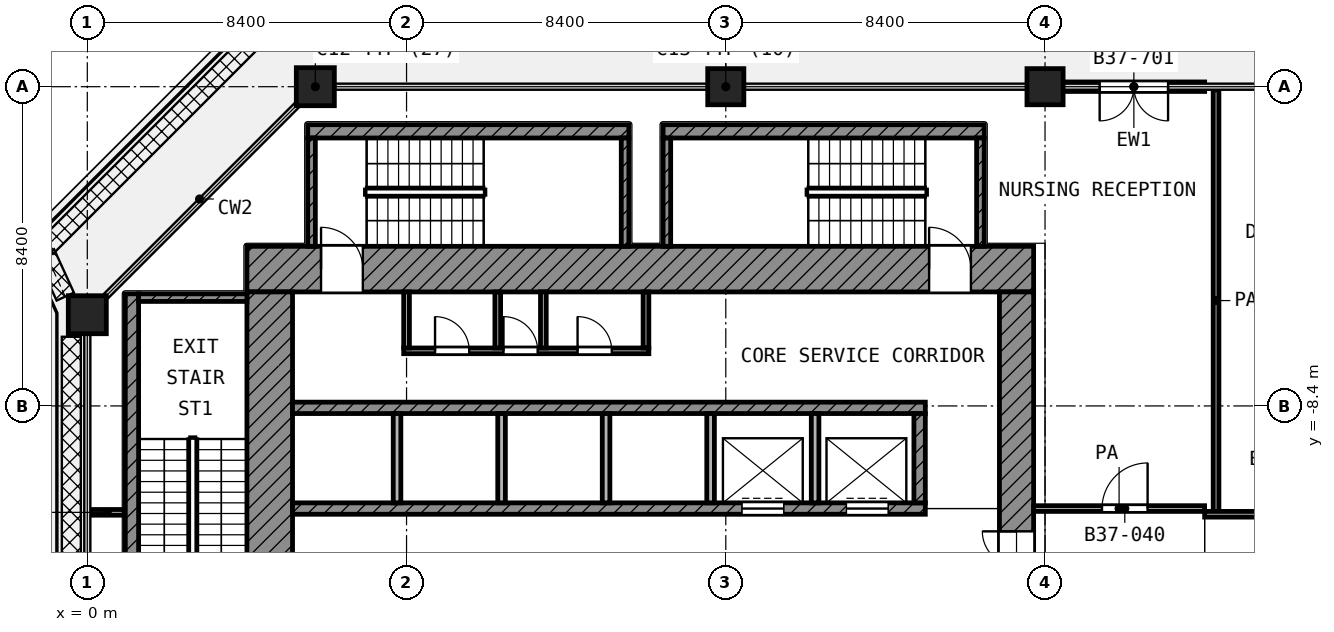
"""IFC4 building model, lengths in metres.
Left out: names, types, materials, properties, quantities, classifications, styles, units other than length and angle.
Written with IfcOpenShell. Run it as: python <this file> out.ifc"""

import sys

from ifc_helpers import new_model, si_unit, direction, frame, frame_2d, origin, origin_2d, place, context, subcontext, project, spatial, rectangle, extrude, element, fill, save


model = new_model("IFC4")
c1 = context("Model", 3, precision=1e-05, world=origin(), true_north=direction((0.0, 1.0)))
c2 = subcontext(c1, "Body", "Model", "MODEL_VIEW")
j1 = project(units=[si_unit("LENGTHUNIT", "METRE"), si_unit("PLANEANGLEUNIT", "RADIAN")], contexts=[c1])
p1 = place(None, origin())
s1 = spatial("IfcSite", under=j1, at=p1, CompositionType="ELEMENT")
p2 = place(p1, origin())
s2 = spatial("IfcBuilding", under=s1, at=p2, CompositionType="ELEMENT")
p3 = place(p2, frame((0.0, 0.0, 162.6)))
s3 = spatial("IfcBuildingStorey", under=s2, at=p3, CompositionType="ELEMENT", Elevation=162.6)
p4 = place(p3, frame((6.0, 0.0, 0.0), z_axis=(0.0, 0.0, 1.0), x_axis=(1.0, 0.0, 0.0)))
e1 = element("IfcColumn", 1, at=p4, inside=s3, PredefinedType="COLUMN", context=c2, shape_type="SweptSolid", body=[
    extrude(rectangle(XDim=1.0, YDim=1.0, at=origin_2d()), origin(), (0.0, 0.0, 1.0), 4.2),
])
for number, where, z_axis, x_axis in (
    (2, (16.8, 0.0, 0.0), (0.0, 0.0, 1.0), (1.0, 0.0, 0.0)),
    (3, (25.2, 0.0, 0.0), (0.0, 0.0, 1.0), (1.0, 0.0, 0.0)),
):
    element("IfcColumn", number, at=place(p3, frame(where, z_axis=z_axis, x_axis=x_axis)), inside=s3, PredefinedType="COLUMN", context=c2, shape_type="SweptSolid", body=[
        extrude(rectangle(XDim=0.95, YDim=0.95, at=origin_2d()), origin(), (0.0, 0.0, 1.0), 4.2),
    ])
p5 = place(p3, frame((0.0, -6.0, 0.0), z_axis=(0.0, 0.0, 1.0), x_axis=(1.0, 0.0, 0.0)))
e4 = element("IfcColumn", 4, at=p5, inside=s3, PredefinedType="COLUMN", context=c2, shape_type="SweptSolid", body=[
    extrude(rectangle(XDim=1.0, YDim=1.0, at=origin_2d()), origin(), (0.0, 0.0, 1.0), 4.2),
])
p6 = place(p3, frame((29.4, 0.0, 0.0), z_axis=(0.0, 0.0, 1.0), x_axis=(-1.0, 0.0, 0.0)))
e5 = element("IfcWall", 5, at=p6, inside=s3, PredefinedType="SOLIDWALL", context=c2, shape_type="SweptSolid", body=[
    extrude(rectangle(XDim=3.725, YDim=0.25, at=frame_2d((1.862, 0.0))), origin(), (0.0, 0.0, 1.0), 2.58),
])
p7 = place(p6, frame((0.962, 0.0, 0.0)))
e6 = element("IfcOpeningElement", 6, at=p7, cuts=e5, PredefinedType="OPENING", context=c2, shape_type="SweptSolid", body=[
    extrude(rectangle(XDim=1.8, YDim=2.1, at=frame_2d((0.9, 1.05))), frame((0.0, 0.135, 0.0), z_axis=(0.0, -1.0, 0.0), x_axis=(1.0, 0.0, 0.0)), (0.0, 0.0, 1.0), 0.27),
])
p8 = place(p3, frame((4.2, -4.8, 0.0), z_axis=(0.0, 0.0, 1.0), x_axis=(1.0, 0.0, 0.0)))
e7 = element("IfcWall", 7, at=p8, inside=s3, PredefinedType="SHEAR", context=c2, shape_type="SweptSolid", body=[
    extrude(rectangle(XDim=20.7, YDim=1.2, at=frame_2d((10.35, 0.0))), origin(), (0.0, 0.0, 1.0), 3.6),
])
p9 = place(p8, frame((1.95, 0.0, 0.0)))
e8 = element("IfcOpeningElement", 8, at=p9, cuts=e7, PredefinedType="OPENING", context=c2, shape_type="SweptSolid", body=[
    extrude(rectangle(XDim=1.1, YDim=2.1, at=frame_2d((0.55, 1.05))), frame((0.0, 0.61, 0.0), z_axis=(0.0, -1.0, 0.0), x_axis=(1.0, 0.0, 0.0)), (0.0, 0.0, 1.0), 1.22),
])
p10 = place(p8, frame((17.95, 0.0, 0.0)))
e9 = element("IfcOpeningElement", 9, at=p10, cuts=e7, PredefinedType="OPENING", context=c2, shape_type="SweptSolid", body=[
    extrude(rectangle(XDim=1.1, YDim=2.1, at=frame_2d((0.55, 1.05))), frame((0.0, 0.61, 0.0), z_axis=(0.0, -1.0, 0.0), x_axis=(1.0, 0.0, 0.0)), (0.0, 0.0, 1.0), 1.22),
])
p11 = place(p3, frame((4.8, -24.9, 0.0), z_axis=(0.0, 0.0, 1.0), x_axis=(0.0, 1.0, 0.0)))
e10 = element("IfcWall", 10, at=p11, inside=s3, PredefinedType="SHEAR", context=c2, shape_type="SweptSolid", body=[
    extrude(rectangle(XDim=19.5, YDim=1.2, at=frame_2d((9.75, 0.0))), origin(), (0.0, 0.0, 1.0), 3.6),
])
p12 = place(p11, frame((11.35, 0.0, 0.0)))
e11 = element("IfcOpeningElement", 11, at=p12, cuts=e10, PredefinedType="OPENING", context=c2, shape_type="SweptSolid", body=[
    extrude(rectangle(XDim=1.1, YDim=2.1, at=frame_2d((0.55, 1.05))), frame((0.0, 0.61, 0.0), z_axis=(0.0, -1.0, 0.0), x_axis=(1.0, 0.0, 0.0)), (0.0, 0.0, 1.0), 1.22),
])
p13 = place(p11, frame((2.05, 0.0, 0.0)))
e12 = element("IfcOpeningElement", 12, at=p13, cuts=e10, PredefinedType="OPENING", context=c2, shape_type="SweptSolid", body=[
    extrude(rectangle(XDim=1.1, YDim=2.1, at=frame_2d((0.55, 1.05))), frame((0.0, 0.61, 0.0), z_axis=(0.0, -1.0, 0.0), x_axis=(1.0, 0.0, 0.0)), (0.0, 0.0, 1.0), 1.22),
])
p14 = place(p3, frame((24.45, -24.0, 0.0), z_axis=(0.0, 0.0, 1.0), x_axis=(0.0, 1.0, 0.0)))
e13 = element("IfcWall", 13, at=p14, inside=s3, PredefinedType="SHEAR", context=c2, shape_type="SweptSolid", body=[
    extrude(rectangle(XDim=18.6, YDim=0.9, at=frame_2d((9.3, 0.0))), origin(), (0.0, 0.0, 1.0), 3.6),
])
p15 = place(p14, frame((10.5, 0.0, 0.0)))
e14 = element("IfcOpeningElement", 14, at=p15, cuts=e13, PredefinedType="OPENING", context=c2, shape_type="SweptSolid", body=[
    extrude(rectangle(XDim=1.8, YDim=2.1, at=frame_2d((0.9, 1.05))), frame((0.0, 0.46, 0.0), z_axis=(0.0, -1.0, 0.0), x_axis=(1.0, 0.0, 0.0)), (0.0, 0.0, 1.0), 0.92),
])
p16 = place(p3, frame((5.4, -8.45, 0.0), z_axis=(0.0, 0.0, 1.0), x_axis=(1.0, 0.0, 0.0)))
e15 = element("IfcWall", 15, at=p16, inside=s3, PredefinedType="SHEAR", context=c2, shape_type="SweptSolid", body=[
    extrude(rectangle(XDim=16.65, YDim=0.3, at=frame_2d((8.325, 0.0))), origin(), (0.0, 0.0, 1.0), 3.6),
])
p17 = place(p3, frame((5.4, -11.1, 0.0), z_axis=(0.0, 0.0, 1.0), x_axis=(1.0, 0.0, 0.0)))
e16 = element("IfcWall", 16, at=p17, inside=s3, PredefinedType="SHEAR", context=c2, shape_type="SweptSolid", body=[
    extrude(rectangle(XDim=16.65, YDim=0.3, at=frame_2d((8.325, 0.0))), origin(), (0.0, 0.0, 1.0), 3.6),
])
p18 = place(p17, frame((11.825, 0.0, 0.0)))
e17 = element("IfcOpeningElement", 17, at=p18, cuts=e16, PredefinedType="OPENING", context=c2, shape_type="SweptSolid", body=[
    extrude(rectangle(XDim=1.1, YDim=2.1, at=frame_2d((0.55, 1.05))), frame((0.0, 0.16, 0.0), z_axis=(0.0, -1.0, 0.0), x_axis=(1.0, 0.0, 0.0)), (0.0, 0.0, 1.0), 0.32),
])
p19 = place(p17, frame((14.575, 0.0, 0.0)))
e18 = element("IfcOpeningElement", 18, at=p19, cuts=e16, PredefinedType="OPENING", context=c2, shape_type="SweptSolid", body=[
    extrude(rectangle(XDim=1.1, YDim=2.1, at=frame_2d((0.55, 1.05))), frame((0.0, 0.16, 0.0), z_axis=(0.0, -1.0, 0.0), x_axis=(1.0, 0.0, 0.0)), (0.0, 0.0, 1.0), 0.32),
])
p20 = place(p3, frame((21.9, -10.95, 0.0), z_axis=(0.0, 0.0, 1.0), x_axis=(0.0, 1.0, 0.0)))
e19 = element("IfcWall", 19, at=p20, inside=s3, PredefinedType="SHEAR", context=c2, shape_type="SweptSolid", body=[
    extrude(rectangle(XDim=2.35, YDim=0.3, at=frame_2d((1.175, 0.0))), origin(), (0.0, 0.0, 1.0), 3.6),
])
for number, where, z_axis, x_axis in (
    (20, (8.15, -10.95, 0.0), (0.0, 0.0, 1.0), (0.0, 1.0, 0.0)),
    (21, (10.9, -10.95, 0.0), (0.0, 0.0, 1.0), (0.0, 1.0, 0.0)),
    (22, (13.65, -10.95, 0.0), (0.0, 0.0, 1.0), (0.0, 1.0, 0.0)),
    (23, (16.4, -10.95, 0.0), (0.0, 0.0, 1.0), (0.0, 1.0, 0.0)),
    (24, (19.15, -10.95, 0.0), (0.0, 0.0, 1.0), (0.0, 1.0, 0.0)),
):
    element("IfcWall", number, at=place(p3, frame(where, z_axis=z_axis, x_axis=x_axis)), inside=s3, PredefinedType="PARTITIONING", context=c2, shape_type="SweptSolid", body=[
        extrude(rectangle(XDim=2.35, YDim=0.2, at=frame_2d((1.175, 0.0))), origin(), (0.0, 0.0, 1.0), 3.6),
    ])
p21 = place(p3, frame((8.325, -6.95, 0.0), z_axis=(0.0, 0.0, 1.0), x_axis=(1.0, 0.0, 0.0)))
e25 = element("IfcWall", 25, at=p21, inside=s3, PredefinedType="PARTITIONING", context=c2, shape_type="SweptSolid", body=[
    extrude(rectangle(XDim=6.45, YDim=0.15, at=frame_2d((3.225, 0.0))), origin(), (0.0, 0.0, 1.0), 3.6),
])
p22 = place(p21, frame((0.825, 0.0, 0.0)))
e26 = element("IfcOpeningElement", 26, at=p22, cuts=e25, PredefinedType="OPENING", context=c2, shape_type="SweptSolid", body=[
    extrude(rectangle(XDim=0.9, YDim=2.1, at=frame_2d((0.45, 1.05))), frame((0.0, 0.085, 0.0), z_axis=(0.0, -1.0, 0.0), x_axis=(1.0, 0.0, 0.0)), (0.0, 0.0, 1.0), 0.17),
])
p23 = place(p21, frame((2.625, 0.0, 0.0)))
e27 = element("IfcOpeningElement", 27, at=p23, cuts=e25, PredefinedType="OPENING", context=c2, shape_type="SweptSolid", body=[
    extrude(rectangle(XDim=0.9, YDim=2.1, at=frame_2d((0.45, 1.05))), frame((0.0, 0.085, 0.0), z_axis=(0.0, -1.0, 0.0), x_axis=(1.0, 0.0, 0.0)), (0.0, 0.0, 1.0), 0.17),
])
p24 = place(p21, frame((4.575, 0.0, 0.0)))
e28 = element("IfcOpeningElement", 28, at=p24, cuts=e25, PredefinedType="OPENING", context=c2, shape_type="SweptSolid", body=[
    extrude(rectangle(XDim=0.9, YDim=2.1, at=frame_2d((0.45, 1.05))), frame((0.0, 0.085, 0.0), z_axis=(0.0, -1.0, 0.0), x_axis=(1.0, 0.0, 0.0)), (0.0, 0.0, 1.0), 0.17),
])
for number, where, z_axis, x_axis in (
    (29, (8.4, -6.875, 0.0), (0.0, 0.0, 1.0), (0.0, 1.0, 0.0)),
    (30, (10.8, -6.875, 0.0), (0.0, 0.0, 1.0), (0.0, 1.0, 0.0)),
    (31, (12.0, -6.875, 0.0), (0.0, 0.0, 1.0), (0.0, 1.0, 0.0)),
    (32, (14.7, -6.875, 0.0), (0.0, 0.0, 1.0), (0.0, 1.0, 0.0)),
):
    element("IfcWall", number, at=place(p3, frame(where, z_axis=z_axis, x_axis=x_axis)), inside=s3, PredefinedType="PARTITIONING", context=c2, shape_type="SweptSolid", body=[
        extrude(rectangle(XDim=1.475, YDim=0.15, at=frame_2d((0.738, 0.0))), origin(), (0.0, 0.0, 1.0), 3.6),
    ])
p25 = place(p3, frame((1.175, -13.9, 0.0), z_axis=(0.0, 0.0, 1.0), x_axis=(0.0, 1.0, 0.0)))
e33 = element("IfcWall", 33, at=p25, inside=s3, PredefinedType="SHEAR", context=c2, shape_type="SweptSolid", body=[
    extrude(rectangle(XDim=8.45, YDim=0.35, at=frame_2d((4.225, 0.0))), origin(), (0.0, 0.0, 1.0), 3.6),
])
p26 = place(p3, frame((1.35, -5.55, 0.0), z_axis=(0.0, 0.0, 1.0), x_axis=(1.0, 0.0, 0.0)))
e34 = element("IfcWall", 34, at=p26, inside=s3, PredefinedType="SHEAR", context=c2, shape_type="SweptSolid", body=[
    extrude(rectangle(XDim=2.85, YDim=0.2, at=frame_2d((1.425, 0.0))), origin(), (0.0, 0.0, 1.0), 3.6),
])
p27 = place(p3, frame((5.8, -1.175, 0.0), z_axis=(0.0, 0.0, 1.0), x_axis=(1.0, 0.0, 0.0)))
e35 = element("IfcWall", 35, at=p27, inside=s3, PredefinedType="SHEAR", context=c2, shape_type="SweptSolid", body=[
    extrude(rectangle(XDim=8.45, YDim=0.35, at=frame_2d((4.225, 0.0))), origin(), (0.0, 0.0, 1.0), 3.6),
])
for number, where, z_axis, x_axis in (
    (36, (5.9, -4.2, 0.0), (0.0, 0.0, 1.0), (0.0, 1.0, 0.0)),
    (37, (14.15, -4.2, 0.0), (0.0, 0.0, 1.0), (0.0, 1.0, 0.0)),
):
    element("IfcWall", number, at=place(p3, frame(where, z_axis=z_axis, x_axis=x_axis)), inside=s3, PredefinedType="SHEAR", context=c2, shape_type="SweptSolid", body=[
        extrude(rectangle(XDim=2.85, YDim=0.2, at=frame_2d((1.425, 0.0))), origin(), (0.0, 0.0, 1.0), 3.6),
    ])
p28 = place(p3, frame((15.15, -1.175, 0.0), z_axis=(0.0, 0.0, 1.0), x_axis=(1.0, 0.0, 0.0)))
e38 = element("IfcWall", 38, at=p28, inside=s3, PredefinedType="SHEAR", context=c2, shape_type="SweptSolid", body=[
    extrude(rectangle(XDim=8.45, YDim=0.35, at=frame_2d((4.225, 0.0))), origin(), (0.0, 0.0, 1.0), 3.6),
])
for number, where, z_axis, x_axis in (
    (39, (15.25, -4.2, 0.0), (0.0, 0.0, 1.0), (0.0, 1.0, 0.0)),
    (40, (23.5, -4.2, 0.0), (0.0, 0.0, 1.0), (0.0, 1.0, 0.0)),
):
    element("IfcWall", number, at=place(p3, frame(where, z_axis=z_axis, x_axis=x_axis)), inside=s3, PredefinedType="SHEAR", context=c2, shape_type="SweptSolid", body=[
        extrude(rectangle(XDim=2.85, YDim=0.2, at=frame_2d((1.425, 0.0))), origin(), (0.0, 0.0, 1.0), 3.6),
    ])
p29 = place(p3, frame((29.4, -11.25, 0.0), z_axis=(0.0, 0.0, 1.0), x_axis=(1.0, 0.0, 0.0)))
e41 = element("IfcWall", 41, at=p29, inside=s3, PredefinedType="PARTITIONING", context=c2, shape_type="SweptSolid", body=[
    extrude(rectangle(XDim=10.782, YDim=0.15, at=frame_2d((5.391, 0.0))), origin(), (0.0, 0.0, 1.0), 3.6),
])
p30 = place(p29, frame((1.75, 0.0, 0.0)))
e42 = element("IfcOpeningElement", 42, at=p30, cuts=e41, PredefinedType="OPENING", context=c2, shape_type="SweptSolid", body=[
    extrude(rectangle(XDim=1.0, YDim=2.1, at=frame_2d((0.5, 1.05))), frame((0.0, 0.085, 0.0), z_axis=(0.0, -1.0, 0.0), x_axis=(1.0, 0.0, 0.0)), (0.0, 0.0, 1.0), 0.17),
])
p31 = place(p29, frame((4.4, 0.0, 0.0)))
e43 = element("IfcOpeningElement", 43, at=p31, cuts=e41, PredefinedType="OPENING", context=c2, shape_type="SweptSolid", body=[
    extrude(rectangle(XDim=1.0, YDim=2.1, at=frame_2d((0.5, 1.05))), frame((0.0, 0.085, 0.0), z_axis=(0.0, -1.0, 0.0), x_axis=(1.0, 0.0, 0.0)), (0.0, 0.0, 1.0), 0.17),
])
p32 = place(p3, frame((0.08, -11.2, 0.0), z_axis=(0.0, 0.0, 1.0), x_axis=(1.0, 0.0, 0.0)))
e44 = element("IfcWall", 44, at=p32, inside=s3, PredefinedType="PARTITIONING", context=c2, shape_type="SweptSolid", body=[
    extrude(rectangle(XDim=0.89, YDim=0.15, at=frame_2d((0.445, 0.0))), origin(), (0.0, 0.0, 1.0), 3.6),
])
p33 = place(p3, frame((24.9, -11.1, 0.0), z_axis=(0.0, 0.0, 1.0), x_axis=(1.0, 0.0, 0.0)))
e45 = element("IfcWall", 45, at=p33, inside=s3, PredefinedType="PARTITIONING", context=c2, shape_type="SweptSolid", body=[
    extrude(rectangle(XDim=4.498, YDim=0.15, at=frame_2d((2.249, 0.0))), origin(), (0.0, 0.0, 1.0), 3.6),
])
p34 = place(p33, frame((1.799, 0.0, 0.0)))
e46 = element("IfcOpeningElement", 46, at=p34, cuts=e45, PredefinedType="OPENING", context=c2, shape_type="SweptSolid", body=[
    extrude(rectangle(XDim=1.2, YDim=2.1, at=frame_2d((0.6, 1.05))), frame((0.0, 0.085, 0.0), z_axis=(0.0, -1.0, 0.0), x_axis=(1.0, 0.0, 0.0)), (0.0, 0.0, 1.0), 0.17),
])
p35 = place(p3, frame((29.7, -11.175, 0.0), z_axis=(0.0, 0.0, 1.0), x_axis=(0.0, 1.0, 0.0)))
e47 = element("IfcWall", 47, at=p35, inside=s3, PredefinedType="PARTITIONING", context=c2, shape_type="SweptSolid", body=[
    extrude(rectangle(XDim=11.095, YDim=0.15, at=frame_2d((5.547, 0.0))), origin(), (0.0, 0.0, 1.0), 2.7),
])
p36 = place(p7, origin())
e48 = element("IfcDoor", 48, at=p36, inside=s3, OperationType="DOUBLE_DOOR_SINGLE_SWING", PredefinedType="DOOR", context=c2, shape_type="SweptSolid", body=[
    extrude(rectangle(XDim=1.8, YDim=2.1, at=frame_2d((0.9, 1.05))), frame((0.0, 0.025, 0.0), z_axis=(0.0, -1.0, 0.0), x_axis=(1.0, 0.0, 0.0)), (0.0, 0.0, 1.0), 0.05),
])
fill(e6, e48)
p37 = place(p18, origin())
e49 = element("IfcDoor", 49, at=p37, inside=s3, OperationType="DOUBLE_DOOR_SLIDING", PredefinedType="DOOR", context=c2, shape_type="SweptSolid", body=[
    extrude(rectangle(XDim=1.1, YDim=2.1, at=frame_2d((0.55, 1.05))), frame((0.0, 0.025, 0.0), z_axis=(0.0, -1.0, 0.0), x_axis=(1.0, 0.0, 0.0)), (0.0, 0.0, 1.0), 0.05),
])
fill(e17, e49)
p38 = place(p19, origin())
e50 = element("IfcDoor", 50, at=p38, inside=s3, OperationType="DOUBLE_DOOR_SLIDING", PredefinedType="DOOR", context=c2, shape_type="SweptSolid", body=[
    extrude(rectangle(XDim=1.1, YDim=2.1, at=frame_2d((0.55, 1.05))), frame((0.0, 0.025, 0.0), z_axis=(0.0, -1.0, 0.0), x_axis=(1.0, 0.0, 0.0)), (0.0, 0.0, 1.0), 0.05),
])
fill(e18, e50)
p39 = place(p9, origin())
e51 = element("IfcDoor", 51, at=p39, inside=s3, OperationType="SINGLE_SWING_LEFT", PredefinedType="DOOR", context=c2, shape_type="SweptSolid", body=[
    extrude(rectangle(XDim=1.1, YDim=2.1, at=frame_2d((0.55, 1.05))), frame((0.0, 0.025, 0.0), z_axis=(0.0, -1.0, 0.0), x_axis=(1.0, 0.0, 0.0)), (0.0, 0.0, 1.0), 0.05),
])
fill(e8, e51)
p40 = place(p10, origin())
e52 = element("IfcDoor", 52, at=p40, inside=s3, OperationType="SINGLE_SWING_LEFT", PredefinedType="DOOR", context=c2, shape_type="SweptSolid", body=[
    extrude(rectangle(XDim=1.1, YDim=2.1, at=frame_2d((0.55, 1.05))), frame((0.0, 0.025, 0.0), z_axis=(0.0, -1.0, 0.0), x_axis=(1.0, 0.0, 0.0)), (0.0, 0.0, 1.0), 0.05),
])
fill(e9, e52)
p41 = place(p15, origin())
e53 = element("IfcDoor", 53, at=p41, inside=s3, OperationType="DOUBLE_DOOR_SINGLE_SWING", PredefinedType="DOOR", context=c2, shape_type="SweptSolid", body=[
    extrude(rectangle(XDim=1.8, YDim=2.1, at=frame_2d((0.9, 1.05))), frame((0.0, 0.025, 0.0), z_axis=(0.0, -1.0, 0.0), x_axis=(1.0, 0.0, 0.0)), (0.0, 0.0, 1.0), 0.05),
])
fill(e14, e53)
p42 = place(p22, origin())
e54 = element("IfcDoor", 54, at=p42, inside=s3, OperationType="SINGLE_SWING_LEFT", PredefinedType="DOOR", context=c2, shape_type="SweptSolid", body=[
    extrude(rectangle(XDim=0.9, YDim=2.1, at=frame_2d((0.45, 1.05))), frame((0.0, 0.025, 0.0), z_axis=(0.0, -1.0, 0.0), x_axis=(1.0, 0.0, 0.0)), (0.0, 0.0, 1.0), 0.05),
])
fill(e26, e54)
p43 = place(p23, origin())
e55 = element("IfcDoor", 55, at=p43, inside=s3, OperationType="SINGLE_SWING_LEFT", PredefinedType="DOOR", context=c2, shape_type="SweptSolid", body=[
    extrude(rectangle(XDim=0.9, YDim=2.1, at=frame_2d((0.45, 1.05))), frame((0.0, 0.025, 0.0), z_axis=(0.0, -1.0, 0.0), x_axis=(1.0, 0.0, 0.0)), (0.0, 0.0, 1.0), 0.05),
])
fill(e27, e55)
p44 = place(p24, origin())
e56 = element("IfcDoor", 56, at=p44, inside=s3, OperationType="SINGLE_SWING_LEFT", PredefinedType="DOOR", context=c2, shape_type="SweptSolid", body=[
    extrude(rectangle(XDim=0.9, YDim=2.1, at=frame_2d((0.45, 1.05))), frame((0.0, 0.025, 0.0), z_axis=(0.0, -1.0, 0.0), x_axis=(1.0, 0.0, 0.0)), (0.0, 0.0, 1.0), 0.05),
])
fill(e28, e56)
p45 = place(p34, origin())
e57 = element("IfcDoor", 57, at=p45, inside=s3, OperationType="SINGLE_SWING_RIGHT", PredefinedType="DOOR", context=c2, shape_type="SweptSolid", body=[
    extrude(rectangle(XDim=1.2, YDim=2.1, at=frame_2d((0.6, 1.05))), frame((0.0, 0.025, 0.0), z_axis=(0.0, -1.0, 0.0), x_axis=(1.0, 0.0, 0.0)), (0.0, 0.0, 1.0), 0.05),
])
fill(e46, e57)
save(model, sys.argv[1])
